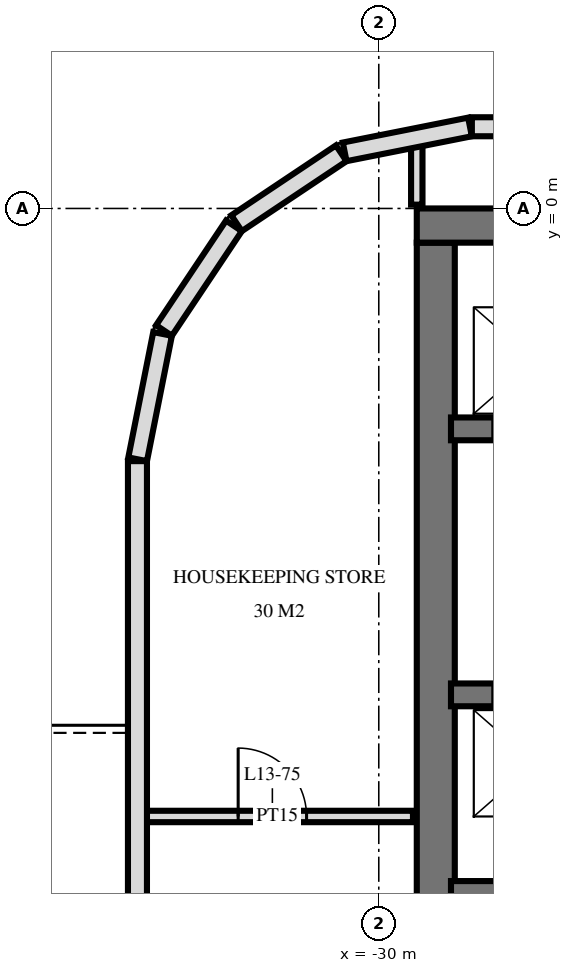
"""IFC4 building model, lengths in metres.
Left out: names, types, materials, properties, quantities, classifications, styles, units other than length and angle.
Written with IfcOpenShell. Run it as: python <this file> out.ifc"""

import sys

from ifc_helpers import new_model, si_unit, direction, frame, frame_2d, origin, place, context, subcontext, project, spatial, rectangle, extrude, element, fill, save


model = new_model("IFC4")
c1 = context("Model", 3, precision=1e-05, world=origin(), true_north=direction((0.0, 1.0)))
c2 = subcontext(c1, "Body", "Model", "MODEL_VIEW")
j1 = project(units=[si_unit("LENGTHUNIT", "METRE"), si_unit("PLANEANGLEUNIT", "RADIAN")], contexts=[c1])
p1 = place(None, origin())
s1 = spatial("IfcSite", under=j1, at=p1, CompositionType="ELEMENT")
p2 = place(p1, origin())
s2 = spatial("IfcBuilding", under=s1, at=p2, CompositionType="ELEMENT")
p3 = place(p2, frame((0.0, 0.0, 56.4)))
s3 = spatial("IfcBuildingStorey", under=s2, at=p3, CompositionType="ELEMENT", Elevation=56.4)
p4 = place(p3, frame((-29.5, -0.225, 0.0), z_axis=(0.0, 0.0, 1.0), x_axis=(1.0, 0.0, 0.0)))
e1 = element("IfcWall", 1, at=p4, inside=s3, PredefinedType="SHEAR", context=c2, shape_type="SweptSolid", body=[
    extrude(rectangle(XDim=19.5, YDim=0.45, at=frame_2d((9.75, 0.0))), origin(), (0.0, 0.0, 1.0), 3.6),
])
p5 = place(p3, frame((-29.25, -14.55, 0.0), z_axis=(0.0, 0.0, 1.0), x_axis=(0.0, 1.0, 0.0)))
e2 = element("IfcWall", 2, at=p5, inside=s3, PredefinedType="SHEAR", context=c2, shape_type="SweptSolid", body=[
    extrude(rectangle(XDim=14.1, YDim=0.5, at=frame_2d((7.05, 0.0))), origin(), (0.0, 0.0, 1.0), 3.6),
])
p6 = place(p3, frame((-29.05, -2.9, 0.0), z_axis=(0.0, 0.0, 1.0), x_axis=(1.0, 0.0, 0.0)))
e3 = element("IfcWall", 3, at=p6, inside=s3, PredefinedType="SHEAR", context=c2, shape_type="SweptSolid", body=[
    extrude(rectangle(XDim=18.7, YDim=0.3, at=frame_2d((9.35, 0.0))), origin(), (0.0, 0.0, 1.0), 3.6),
])
p7 = place(p6, frame((2.95, 0.0, 0.0)))
e4 = element("IfcOpeningElement", 4, at=p7, cuts=e3, PredefinedType="OPENING", context=c2, shape_type="SweptSolid", body=[
    extrude(rectangle(XDim=1.1, YDim=2.1, at=frame_2d((0.55, 1.05))), frame((0.0, 0.16, 0.0), z_axis=(0.0, -1.0, 0.0), x_axis=(1.0, 0.0, 0.0)), (0.0, 0.0, 1.0), 0.32),
])
p8 = place(p6, frame((0.55, 0.0, 0.0)))
e5 = element("IfcOpeningElement", 5, at=p8, cuts=e3, PredefinedType="OPENING", context=c2, shape_type="SweptSolid", body=[
    extrude(rectangle(XDim=1.1, YDim=2.1, at=frame_2d((0.55, 1.05))), frame((0.0, 0.16, 0.0), z_axis=(0.0, -1.0, 0.0), x_axis=(1.0, 0.0, 0.0)), (0.0, 0.0, 1.0), 0.32),
])
p9 = place(p6, frame((10.9, 0.0, 0.0)))
e6 = element("IfcOpeningElement", 6, at=p9, cuts=e3, PredefinedType="OPENING", context=c2, shape_type="SweptSolid", body=[
    extrude(rectangle(XDim=0.9, YDim=2.1, at=frame_2d((0.45, 1.05))), frame((0.0, 0.16, 0.0), z_axis=(0.0, -1.0, 0.0), x_axis=(1.0, 0.0, 0.0)), (0.0, 0.0, 1.0), 0.32),
])
p10 = place(p6, frame((16.85, 0.0, 0.0)))
e7 = element("IfcOpeningElement", 7, at=p10, cuts=e3, PredefinedType="OPENING", context=c2, shape_type="SweptSolid", body=[
    extrude(rectangle(XDim=1.0, YDim=2.1, at=frame_2d((0.5, 1.05))), frame((0.0, 0.16, 0.0), z_axis=(0.0, -1.0, 0.0), x_axis=(1.0, 0.0, 0.0)), (0.0, 0.0, 1.0), 0.32),
])
p11 = place(p6, frame((13.85, 0.0, 0.0)))
e8 = element("IfcOpeningElement", 8, at=p11, cuts=e3, PredefinedType="OPENING", context=c2, shape_type="SweptSolid", body=[
    extrude(rectangle(XDim=1.0, YDim=2.1, at=frame_2d((0.5, 1.05))), frame((0.0, 0.16, 0.0), z_axis=(0.0, -1.0, 0.0), x_axis=(1.0, 0.0, 0.0)), (0.0, 0.0, 1.0), 0.32),
])
p12 = place(p6, frame((5.6, 0.0, 0.0)))
e9 = element("IfcOpeningElement", 9, at=p12, cuts=e3, PredefinedType="OPENING", context=c2, shape_type="SweptSolid", body=[
    extrude(rectangle(XDim=1.0, YDim=2.1, at=frame_2d((0.5, 1.05))), frame((0.0, 0.16, 0.0), z_axis=(0.0, -1.0, 0.0), x_axis=(1.0, 0.0, 0.0)), (0.0, 0.0, 1.0), 0.32),
])
p13 = place(p3, frame((-29.05, -6.4, 0.0), z_axis=(0.0, 0.0, 1.0), x_axis=(1.0, 0.0, 0.0)))
e10 = element("IfcWall", 10, at=p13, inside=s3, PredefinedType="SHEAR", context=c2, shape_type="SweptSolid", body=[
    extrude(rectangle(XDim=18.7, YDim=0.3, at=frame_2d((9.35, 0.0))), origin(), (0.0, 0.0, 1.0), 3.6),
])
p14 = place(p13, frame((2.95, 0.0, 0.0)))
e11 = element("IfcOpeningElement", 11, at=p14, cuts=e10, PredefinedType="OPENING", context=c2, shape_type="SweptSolid", body=[
    extrude(rectangle(XDim=1.1, YDim=2.1, at=frame_2d((0.55, 1.05))), frame((0.0, 0.16, 0.0), z_axis=(0.0, -1.0, 0.0), x_axis=(1.0, 0.0, 0.0)), (0.0, 0.0, 1.0), 0.32),
])
p15 = place(p13, frame((0.55, 0.0, 0.0)))
e12 = element("IfcOpeningElement", 12, at=p15, cuts=e10, PredefinedType="OPENING", context=c2, shape_type="SweptSolid", body=[
    extrude(rectangle(XDim=1.1, YDim=2.1, at=frame_2d((0.55, 1.05))), frame((0.0, 0.16, 0.0), z_axis=(0.0, -1.0, 0.0), x_axis=(1.0, 0.0, 0.0)), (0.0, 0.0, 1.0), 0.32),
])
p16 = place(p13, frame((10.8, 0.0, 0.0)))
e13 = element("IfcOpeningElement", 13, at=p16, cuts=e10, PredefinedType="OPENING", context=c2, shape_type="SweptSolid", body=[
    extrude(rectangle(XDim=1.1, YDim=2.1, at=frame_2d((0.55, 1.05))), frame((0.0, 0.16, 0.0), z_axis=(0.0, -1.0, 0.0), x_axis=(1.0, 0.0, 0.0)), (0.0, 0.0, 1.0), 0.32),
])
p17 = place(p13, frame((5.6, 0.0, 0.0)))
e14 = element("IfcOpeningElement", 14, at=p17, cuts=e10, PredefinedType="OPENING", context=c2, shape_type="SweptSolid", body=[
    extrude(rectangle(XDim=1.0, YDim=2.1, at=frame_2d((0.5, 1.05))), frame((0.0, 0.16, 0.0), z_axis=(0.0, -1.0, 0.0), x_axis=(1.0, 0.0, 0.0)), (0.0, 0.0, 1.0), 0.32),
])
p18 = place(p3, frame((-29.05, -9.0, 0.0), z_axis=(0.0, 0.0, 1.0), x_axis=(1.0, 0.0, 0.0)))
e15 = element("IfcWall", 15, at=p18, inside=s3, PredefinedType="SHEAR", context=c2, shape_type="SweptSolid", body=[
    extrude(rectangle(XDim=18.7, YDim=0.3, at=frame_2d((9.35, 0.0))), origin(), (0.0, 0.0, 1.0), 3.6),
])
p19 = place(p18, frame((13.8, 0.0, 0.0)))
e16 = element("IfcOpeningElement", 16, at=p19, cuts=e15, PredefinedType="OPENING", context=c2, shape_type="SweptSolid", body=[
    extrude(rectangle(XDim=1.1, YDim=2.1, at=frame_2d((0.55, 1.05))), frame((0.0, 0.16, 0.0), z_axis=(0.0, -1.0, 0.0), x_axis=(1.0, 0.0, 0.0)), (0.0, 0.0, 1.0), 0.32),
])
p20 = place(p3, frame((28.775, 1.075, 0.0), z_axis=(0.0, 0.0, 1.0), x_axis=(-1.0, 0.0, 0.0)))
e17 = element("IfcWall", 17, at=p20, inside=s3, PredefinedType="SOLIDWALL", context=c2, shape_type="SweptSolid", body=[
    extrude(rectangle(XDim=57.551, YDim=0.25, at=frame_2d((28.775, 0.0))), origin(), (0.0, 0.0, 1.0), 3.32),
])
p21 = place(p20, frame((21.275, 0.0, 0.3)))
e18 = element("IfcOpeningElement", 18, at=p21, cuts=e17, PredefinedType="OPENING", context=c2, shape_type="SweptSolid", body=[
    extrude(rectangle(XDim=2.4, YDim=2.1, at=frame_2d((1.2, 1.05))), frame((0.0, 0.135, 0.0), z_axis=(0.0, -1.0, 0.0), x_axis=(1.0, 0.0, 0.0)), (0.0, 0.0, 1.0), 0.27),
])
p22 = place(p20, frame((24.275, 0.0, 0.3)))
e19 = element("IfcOpeningElement", 19, at=p22, cuts=e17, PredefinedType="OPENING", context=c2, shape_type="SweptSolid", body=[
    extrude(rectangle(XDim=2.4, YDim=2.1, at=frame_2d((1.2, 1.05))), frame((0.0, 0.135, 0.0), z_axis=(0.0, -1.0, 0.0), x_axis=(1.0, 0.0, 0.0)), (0.0, 0.0, 1.0), 0.27),
])
p23 = place(p3, frame((-28.8, 1.073, 0.0), z_axis=(0.0, 0.0, 1.0), x_axis=(-0.980803419081, -0.194999110559, 0.0)))
e20 = element("IfcWall", 20, at=p23, inside=s3, PredefinedType="SOLIDWALL", context=c2, shape_type="SweptSolid", body=[
    extrude(rectangle(XDim=1.681, YDim=0.25, at=frame_2d((0.841, 0.0))), origin(), (0.0, 0.0, 1.0), 3.32),
])
for number, where, z_axis, x_axis in (
    (21, (-30.494, 0.726, 0.0), (0.0, 0.0, 1.0), (-0.831, -0.556, 0.0)),
    (22, (-31.906, -0.229, 0.0), (0.0, 0.0, 1.0), (-0.556, -0.831, 0.0)),
):
    element("IfcWall", number, at=place(p3, frame(where, z_axis=z_axis, x_axis=x_axis)), inside=s3, PredefinedType="SOLIDWALL", context=c2, shape_type="SweptSolid", body=[
        extrude(rectangle(XDim=1.656, YDim=0.25, at=frame_2d((0.828, 0.0))), origin(), (0.0, 0.0, 1.0), 3.32),
    ])
p24 = place(p3, frame((-32.844, -1.651, 0.0), z_axis=(0.0, 0.0, 1.0), x_axis=(-0.19513878023, -0.980775640221, 0.0)))
e23 = element("IfcWall", 23, at=p24, inside=s3, PredefinedType="SOLIDWALL", context=c2, shape_type="SweptSolid", body=[
    extrude(rectangle(XDim=1.681, YDim=0.25, at=frame_2d((0.841, 0.0))), origin(), (0.0, 0.0, 1.0), 3.32),
])
p25 = place(p3, frame((-33.175, -3.325, 0.0), z_axis=(0.0, 0.0, 1.0), x_axis=(0.0, -1.0, 0.0)))
e24 = element("IfcWall", 24, at=p25, inside=s3, PredefinedType="SOLIDWALL", context=c2, shape_type="SweptSolid", body=[
    extrude(rectangle(XDim=21.551, YDim=0.25, at=frame_2d((10.775, 0.0))), origin(), (0.0, 0.0, 1.0), 3.32),
])
p26 = place(p25, frame((7.275, 0.0, 0.0)))
e25 = element("IfcOpeningElement", 25, at=p26, cuts=e24, PredefinedType="OPENING", context=c2, shape_type="SweptSolid", body=[
    extrude(rectangle(XDim=1.8, YDim=2.4, at=frame_2d((0.9, 1.2))), frame((0.0, 0.135, 0.0), z_axis=(0.0, -1.0, 0.0), x_axis=(1.0, 0.0, 0.0)), (0.0, 0.0, 1.0), 0.27),
])
p27 = place(p25, frame((12.075, 0.0, 0.3)))
e26 = element("IfcOpeningElement", 26, at=p27, cuts=e24, PredefinedType="OPENING", context=c2, shape_type="SweptSolid", body=[
    extrude(rectangle(XDim=1.2, YDim=2.1, at=frame_2d((0.6, 1.05))), frame((0.0, 0.135, 0.0), z_axis=(0.0, -1.0, 0.0), x_axis=(1.0, 0.0, 0.0)), (0.0, 0.0, 1.0), 0.27),
])
p28 = place(p25, frame((14.875, 0.0, 0.0)))
e27 = element("IfcOpeningElement", 27, at=p28, cuts=e24, PredefinedType="OPENING", context=c2, shape_type="SweptSolid", body=[
    extrude(rectangle(XDim=1.8, YDim=2.4, at=frame_2d((0.9, 1.2))), frame((0.0, 0.135, 0.0), z_axis=(0.0, -1.0, 0.0), x_axis=(1.0, 0.0, 0.0)), (0.0, 0.0, 1.0), 0.27),
])
p29 = place(p25, frame((18.875, 0.0, 0.0)))
e28 = element("IfcOpeningElement", 28, at=p29, cuts=e24, PredefinedType="OPENING", context=c2, shape_type="SweptSolid", body=[
    extrude(rectangle(XDim=1.8, YDim=2.4, at=frame_2d((0.9, 1.2))), frame((0.0, 0.135, 0.0), z_axis=(0.0, -1.0, 0.0), x_axis=(1.0, 0.0, 0.0)), (0.0, 0.0, 1.0), 0.27),
])
p30 = place(p3, frame((-29.5, 0.05, 0.0), z_axis=(0.0, 0.0, 1.0), x_axis=(0.0, 1.0, 0.0)))
e29 = element("IfcWall", 29, at=p30, inside=s3, PredefinedType="PARTITIONING", context=c2, shape_type="SweptSolid", body=[
    extrude(rectangle(XDim=0.827, YDim=0.15, at=frame_2d((0.414, 0.0))), origin(), (0.0, 0.0, 1.0), 3.32),
])
p31 = place(p3, frame((-33.12, -8.0, 0.0), z_axis=(0.0, 0.0, 1.0), x_axis=(1.0, 0.0, 0.0)))
e30 = element("IfcWall", 30, at=p31, inside=s3, PredefinedType="PARTITIONING", context=c2, shape_type="SweptSolid", body=[
    extrude(rectangle(XDim=3.57, YDim=0.15, at=frame_2d((1.785, 0.0))), origin(), (0.0, 0.0, 1.0), 3.32),
])
p32 = place(p31, frame((1.27, 0.0, 0.0)))
e31 = element("IfcOpeningElement", 31, at=p32, cuts=e30, PredefinedType="OPENING", context=c2, shape_type="SweptSolid", body=[
    extrude(rectangle(XDim=0.9, YDim=2.1, at=frame_2d((0.45, 1.05))), frame((0.0, 0.085, 0.0), z_axis=(0.0, -1.0, 0.0), x_axis=(1.0, 0.0, 0.0)), (0.0, 0.0, 1.0), 0.17),
])
p33 = place(p32, origin())
e32 = element("IfcDoor", 32, at=p33, inside=s3, OperationType="SINGLE_SWING_RIGHT", PredefinedType="DOOR", context=c2, shape_type="SweptSolid", body=[
    extrude(rectangle(XDim=0.9, YDim=2.1, at=frame_2d((0.45, 1.05))), frame((0.0, 0.025, 0.0), z_axis=(0.0, -1.0, 0.0), x_axis=(1.0, 0.0, 0.0)), (0.0, 0.0, 1.0), 0.05),
])
fill(e31, e32)
save(model, sys.argv[1])
